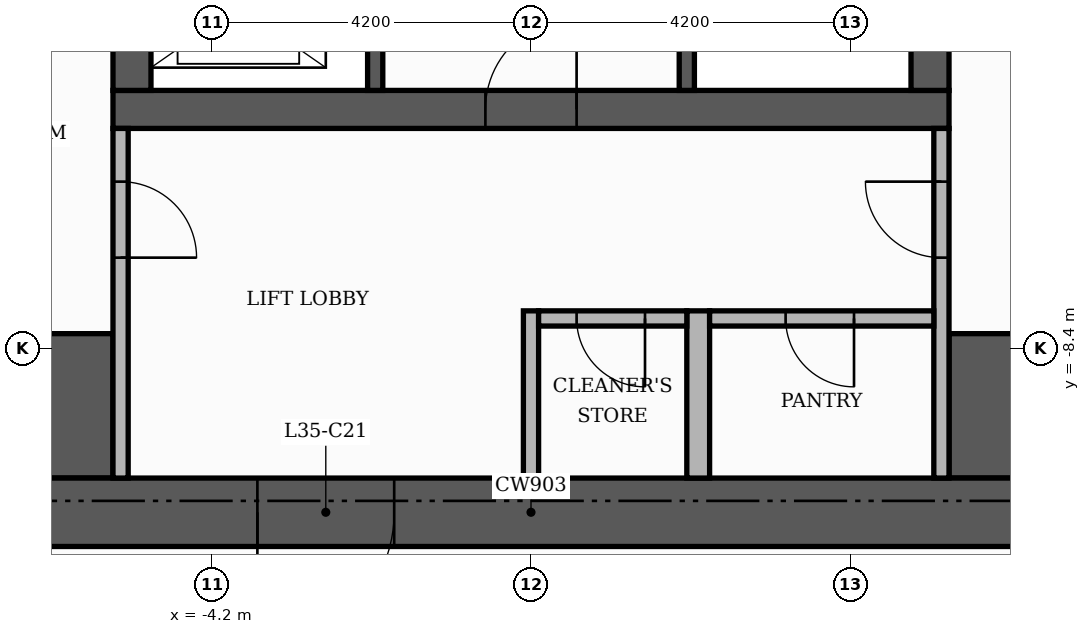
"""IFC4 building model, lengths in metres.
Left out: names, types, materials, properties, quantities, classifications, styles, units other than length and angle.
Written with IfcOpenShell. Run it as: python <this file> out.ifc"""

import sys

from ifc_helpers import new_model, si_unit, direction, frame, frame_2d, origin, place, context, subcontext, project, spatial, rectangle, extrude, element, fill, save


model = new_model("IFC4")
c1 = context("Model", 3, precision=1e-05, world=origin(), true_north=direction((0.0, 1.0)))
c2 = subcontext(c1, "Body", "Model", "MODEL_VIEW")
j1 = project(units=[si_unit("LENGTHUNIT", "METRE"), si_unit("PLANEANGLEUNIT", "RADIAN")], contexts=[c1])
p1 = place(None, origin())
s1 = spatial("IfcSite", under=j1, at=p1, CompositionType="ELEMENT")
p2 = place(p1, origin())
s2 = spatial("IfcBuilding", under=s1, at=p2, CompositionType="ELEMENT")
p3 = place(p2, frame((0.0, 0.0, 149.4)))
s3 = spatial("IfcBuildingStorey", under=s2, at=p3, CompositionType="ELEMENT", Elevation=149.4)
p4 = place(p3, frame((-5.5, -5.25, 0.0), z_axis=(0.0, 0.0, 1.0), x_axis=(1.0, 0.0, 0.0)))
e1 = element("IfcWall", 1, at=p4, inside=s3, PredefinedType="SHEAR", context=c2, shape_type="SweptSolid", body=[
    extrude(rectangle(XDim=11.0, YDim=0.5, at=frame_2d((5.5, 0.0))), origin(), (0.0, 0.0, 1.0), 3.48),
])
p5 = place(p4, frame((4.9, 0.0, 0.0)))
e2 = element("IfcOpeningElement", 2, at=p5, cuts=e1, PredefinedType="OPENING", context=c2, shape_type="SweptSolid", body=[
    extrude(rectangle(XDim=1.2, YDim=2.1, at=frame_2d((0.6, 1.05))), frame((0.0, 0.26, 0.0), z_axis=(0.0, -1.0, 0.0), x_axis=(1.0, 0.0, 0.0)), (0.0, 0.0, 1.0), 0.52),
])
for number, where, z_axis, x_axis in (
    (3, (-5.25, -5.0, 0.0), (0.0, 0.0, 1.0), (0.0, 1.0, 0.0)),
    (4, (5.25, -5.0, 0.0), (0.0, 0.0, 1.0), (0.0, 1.0, 0.0)),
):
    element("IfcWall", number, at=place(p3, frame(where, z_axis=z_axis, x_axis=x_axis)), inside=s3, PredefinedType="SHEAR", context=c2, shape_type="SweptSolid", body=[
        extrude(rectangle(XDim=10.5, YDim=0.5, at=frame_2d((5.25, 0.0))), origin(), (0.0, 0.0, 1.0), 3.48),
    ])
for number, where, z_axis, x_axis in (
    (5, (-10.1, -9.15, 0.0), (0.0, 0.0, 1.0), (1.0, 0.0, 0.0)),
    (6, (5.5, -9.15, 0.0), (0.0, 0.0, 1.0), (1.0, 0.0, 0.0)),
):
    element("IfcWall", number, at=place(p3, frame(where, z_axis=z_axis, x_axis=x_axis)), inside=s3, PredefinedType="SHEAR", context=c2, shape_type="SweptSolid", body=[
        extrude(rectangle(XDim=4.6, YDim=1.9, at=frame_2d((2.3, 0.0))), origin(), (0.0, 0.0, 1.0), 3.48),
    ])
p6 = place(p3, frame((2.05, -5.0, 0.0), z_axis=(0.0, 0.0, 1.0), x_axis=(0.0, 1.0, 0.0)))
e7 = element("IfcWall", 7, at=p6, inside=s3, PredefinedType="SHEAR", context=c2, shape_type="SweptSolid", body=[
    extrude(rectangle(XDim=6.6, YDim=0.2, at=frame_2d((3.3, 0.0))), origin(), (0.0, 0.0, 1.0), 3.48),
])
p7 = place(p6, frame((5.25, 0.0, 0.0)))
e8 = element("IfcOpeningElement", 8, at=p7, cuts=e7, PredefinedType="OPENING", context=c2, shape_type="SweptSolid", body=[
    extrude(rectangle(XDim=1.0, YDim=2.1, at=frame_2d((0.5, 1.05))), frame((0.0, 0.11, 0.0), z_axis=(0.0, -1.0, 0.0), x_axis=(1.0, 0.0, 0.0)), (0.0, 0.0, 1.0), 0.22),
])
p8 = place(p3, frame((-2.05, -5.0, 0.0), z_axis=(0.0, 0.0, 1.0), x_axis=(0.0, 1.0, 0.0)))
e9 = element("IfcWall", 9, at=p8, inside=s3, PredefinedType="SHEAR", context=c2, shape_type="SweptSolid", body=[
    extrude(rectangle(XDim=3.4, YDim=0.2, at=frame_2d((1.7, 0.0))), origin(), (0.0, 0.0, 1.0), 3.48),
])
p9 = place(p8, frame((0.55, 0.0, 0.0)))
e10 = element("IfcOpeningElement", 10, at=p9, cuts=e9, PredefinedType="OPENING", context=c2, shape_type="SweptSolid", body=[
    extrude(rectangle(XDim=1.1, YDim=2.1, at=frame_2d((0.55, 1.05))), frame((0.0, 0.11, 0.0), z_axis=(0.0, -1.0, 0.0), x_axis=(1.0, 0.0, 0.0)), (0.0, 0.0, 1.0), 0.22),
])
p10 = place(p8, frame((2.45, 0.0, 0.0)))
e11 = element("IfcOpeningElement", 11, at=p10, cuts=e9, PredefinedType="OPENING", context=c2, shape_type="SweptSolid", body=[
    extrude(rectangle(XDim=0.8, YDim=2.1, at=frame_2d((0.4, 1.05))), frame((0.0, 0.11, 0.0), z_axis=(0.0, -1.0, 0.0), x_axis=(1.0, 0.0, 0.0)), (0.0, 0.0, 1.0), 0.22),
])
p11 = place(p3, frame((-11.0, -10.55, 0.0), z_axis=(0.0, 0.0, 1.0), x_axis=(1.0, 0.0, 0.0)))
e12 = element("IfcWall", 12, at=p11, inside=s3, PredefinedType="SHEAR", context=c2, shape_type="SweptSolid", body=[
    extrude(rectangle(XDim=22.0, YDim=0.9, at=frame_2d((11.0, 0.0))), origin(), (0.0, 0.0, 1.0), 3.48),
])
p12 = place(p11, frame((7.4, 0.0, 0.0)))
e13 = element("IfcOpeningElement", 13, at=p12, cuts=e12, PredefinedType="OPENING", context=c2, shape_type="SweptSolid", body=[
    extrude(rectangle(XDim=1.8, YDim=2.2, at=frame_2d((0.9, 1.1))), frame((0.0, 0.46, 0.0), z_axis=(0.0, -1.0, 0.0), x_axis=(1.0, 0.0, 0.0)), (0.0, 0.0, 1.0), 0.92),
])
p13 = place(p3, frame((-5.4, -10.1, 0.0), z_axis=(0.0, 0.0, 1.0), x_axis=(0.0, 1.0, 0.0)))
e14 = element("IfcWall", 14, at=p13, inside=s3, PredefinedType="PARTITIONING", context=c2, shape_type="SweptSolid", body=[
    extrude(rectangle(XDim=4.6, YDim=0.2, at=frame_2d((2.3, 0.0))), origin(), (0.0, 0.0, 1.0), 3.48),
])
p14 = place(p13, frame((2.9, 0.0, 0.0)))
e15 = element("IfcOpeningElement", 15, at=p14, cuts=e14, PredefinedType="OPENING", context=c2, shape_type="SweptSolid", body=[
    extrude(rectangle(XDim=1.0, YDim=2.1, at=frame_2d((0.5, 1.05))), frame((0.0, 0.11, 0.0), z_axis=(0.0, -1.0, 0.0), x_axis=(1.0, 0.0, 0.0)), (0.0, 0.0, 1.0), 0.22),
])
p15 = place(p3, frame((0.0, -10.1, 0.0), z_axis=(0.0, 0.0, 1.0), x_axis=(0.0, 1.0, 0.0)))
e16 = element("IfcWall", 16, at=p15, inside=s3, PredefinedType="PARTITIONING", context=c2, shape_type="SweptSolid", body=[
    extrude(rectangle(XDim=2.2, YDim=0.2, at=frame_2d((1.1, 0.0))), origin(), (0.0, 0.0, 1.0), 3.48),
])
p16 = place(p3, frame((2.2, -10.1, 0.0), z_axis=(0.0, 0.0, 1.0), x_axis=(0.0, 1.0, 0.0)))
e17 = element("IfcWall", 17, at=p16, inside=s3, PredefinedType="PARTITIONING", context=c2, shape_type="SweptSolid", body=[
    extrude(rectangle(XDim=2.2, YDim=0.3, at=frame_2d((1.1, 0.0))), origin(), (0.0, 0.0, 1.0), 3.48),
])
p17 = place(p3, frame((5.4, -10.1, 0.0), z_axis=(0.0, 0.0, 1.0), x_axis=(0.0, 1.0, 0.0)))
e18 = element("IfcWall", 18, at=p17, inside=s3, PredefinedType="PARTITIONING", context=c2, shape_type="SweptSolid", body=[
    extrude(rectangle(XDim=4.6, YDim=0.2, at=frame_2d((2.3, 0.0))), origin(), (0.0, 0.0, 1.0), 3.48),
])
p18 = place(p17, frame((2.9, 0.0, 0.0)))
e19 = element("IfcOpeningElement", 19, at=p18, cuts=e18, PredefinedType="OPENING", context=c2, shape_type="SweptSolid", body=[
    extrude(rectangle(XDim=1.0, YDim=2.1, at=frame_2d((0.5, 1.05))), frame((0.0, 0.11, 0.0), z_axis=(0.0, -1.0, 0.0), x_axis=(1.0, 0.0, 0.0)), (0.0, 0.0, 1.0), 0.22),
])
p19 = place(p3, frame((0.1, -8.0, 0.0), z_axis=(0.0, 0.0, 1.0), x_axis=(1.0, 0.0, 0.0)))
e20 = element("IfcWall", 20, at=p19, inside=s3, PredefinedType="PARTITIONING", context=c2, shape_type="SweptSolid", body=[
    extrude(rectangle(XDim=1.95, YDim=0.2, at=frame_2d((0.975, 0.0))), origin(), (0.0, 0.0, 1.0), 3.48),
])
p20 = place(p19, frame((0.5, 0.0, 0.0)))
e21 = element("IfcOpeningElement", 21, at=p20, cuts=e20, PredefinedType="OPENING", context=c2, shape_type="SweptSolid", body=[
    extrude(rectangle(XDim=0.9, YDim=2.1, at=frame_2d((0.45, 1.05))), frame((0.0, 0.11, 0.0), z_axis=(0.0, -1.0, 0.0), x_axis=(1.0, 0.0, 0.0)), (0.0, 0.0, 1.0), 0.22),
])
p21 = place(p3, frame((2.35, -8.0, 0.0), z_axis=(0.0, 0.0, 1.0), x_axis=(1.0, 0.0, 0.0)))
e22 = element("IfcWall", 22, at=p21, inside=s3, PredefinedType="PARTITIONING", context=c2, shape_type="SweptSolid", body=[
    extrude(rectangle(XDim=2.95, YDim=0.2, at=frame_2d((1.475, 0.0))), origin(), (0.0, 0.0, 1.0), 3.48),
])
p22 = place(p21, frame((1.0, 0.0, 0.0)))
e23 = element("IfcOpeningElement", 23, at=p22, cuts=e22, PredefinedType="OPENING", context=c2, shape_type="SweptSolid", body=[
    extrude(rectangle(XDim=0.9, YDim=2.1, at=frame_2d((0.45, 1.05))), frame((0.0, 0.11, 0.0), z_axis=(0.0, -1.0, 0.0), x_axis=(1.0, 0.0, 0.0)), (0.0, 0.0, 1.0), 0.22),
])
p23 = place(p5, origin())
e24 = element("IfcDoor", 24, at=p23, inside=s3, OperationType="SINGLE_SWING_RIGHT", PredefinedType="DOOR", context=c2, shape_type="SweptSolid", body=[
    extrude(rectangle(XDim=1.2, YDim=2.1, at=frame_2d((0.6, 1.05))), frame((0.0, 0.025, 0.0), z_axis=(0.0, -1.0, 0.0), x_axis=(1.0, 0.0, 0.0)), (0.0, 0.0, 1.0), 0.05),
])
fill(e2, e24)
p24 = place(p14, frame((1.0, 0.0, 0.0), z_axis=(0.0, 0.0, 1.0), x_axis=(-1.0, 0.0, 0.0)))
e25 = element("IfcDoor", 25, at=p24, inside=s3, OperationType="SINGLE_SWING_LEFT", PredefinedType="DOOR", context=c2, shape_type="SweptSolid", body=[
    extrude(rectangle(XDim=1.0, YDim=2.1, at=frame_2d((0.5, 1.05))), frame((0.0, 0.025, 0.0), z_axis=(0.0, -1.0, 0.0), x_axis=(1.0, 0.0, 0.0)), (0.0, 0.0, 1.0), 0.05),
])
fill(e15, e25)
p25 = place(p18, origin())
e26 = element("IfcDoor", 26, at=p25, inside=s3, OperationType="SINGLE_SWING_RIGHT", PredefinedType="DOOR", context=c2, shape_type="SweptSolid", body=[
    extrude(rectangle(XDim=1.0, YDim=2.1, at=frame_2d((0.5, 1.05))), frame((0.0, 0.025, 0.0), z_axis=(0.0, -1.0, 0.0), x_axis=(1.0, 0.0, 0.0)), (0.0, 0.0, 1.0), 0.05),
])
fill(e19, e26)
p26 = place(p12, frame((1.8, 0.0, 0.0), z_axis=(0.0, 0.0, 1.0), x_axis=(-1.0, 0.0, 0.0)))
e27 = element("IfcDoor", 27, at=p26, inside=s3, OperationType="DOUBLE_DOOR_SINGLE_SWING", PredefinedType="DOOR", context=c2, shape_type="SweptSolid", body=[
    extrude(rectangle(XDim=1.8, YDim=2.2, at=frame_2d((0.9, 1.1))), frame((0.0, 0.025, 0.0), z_axis=(0.0, -1.0, 0.0), x_axis=(1.0, 0.0, 0.0)), (0.0, 0.0, 1.0), 0.05),
])
fill(e13, e27)
p27 = place(p20, frame((0.9, 0.0, 0.0), z_axis=(0.0, 0.0, 1.0), x_axis=(-1.0, 0.0, 0.0)))
e28 = element("IfcDoor", 28, at=p27, inside=s3, OperationType="SINGLE_SWING_RIGHT", PredefinedType="DOOR", context=c2, shape_type="SweptSolid", body=[
    extrude(rectangle(XDim=0.9, YDim=2.1, at=frame_2d((0.45, 1.05))), frame((0.0, 0.025, 0.0), z_axis=(0.0, -1.0, 0.0), x_axis=(1.0, 0.0, 0.0)), (0.0, 0.0, 1.0), 0.05),
])
fill(e21, e28)
p28 = place(p22, frame((0.9, 0.0, 0.0), z_axis=(0.0, 0.0, 1.0), x_axis=(-1.0, 0.0, 0.0)))
e29 = element("IfcDoor", 29, at=p28, inside=s3, OperationType="SINGLE_SWING_RIGHT", PredefinedType="DOOR", context=c2, shape_type="SweptSolid", body=[
    extrude(rectangle(XDim=0.9, YDim=2.1, at=frame_2d((0.45, 1.05))), frame((0.0, 0.025, 0.0), z_axis=(0.0, -1.0, 0.0), x_axis=(1.0, 0.0, 0.0)), (0.0, 0.0, 1.0), 0.05),
])
fill(e23, e29)
save(model, sys.argv[1])
